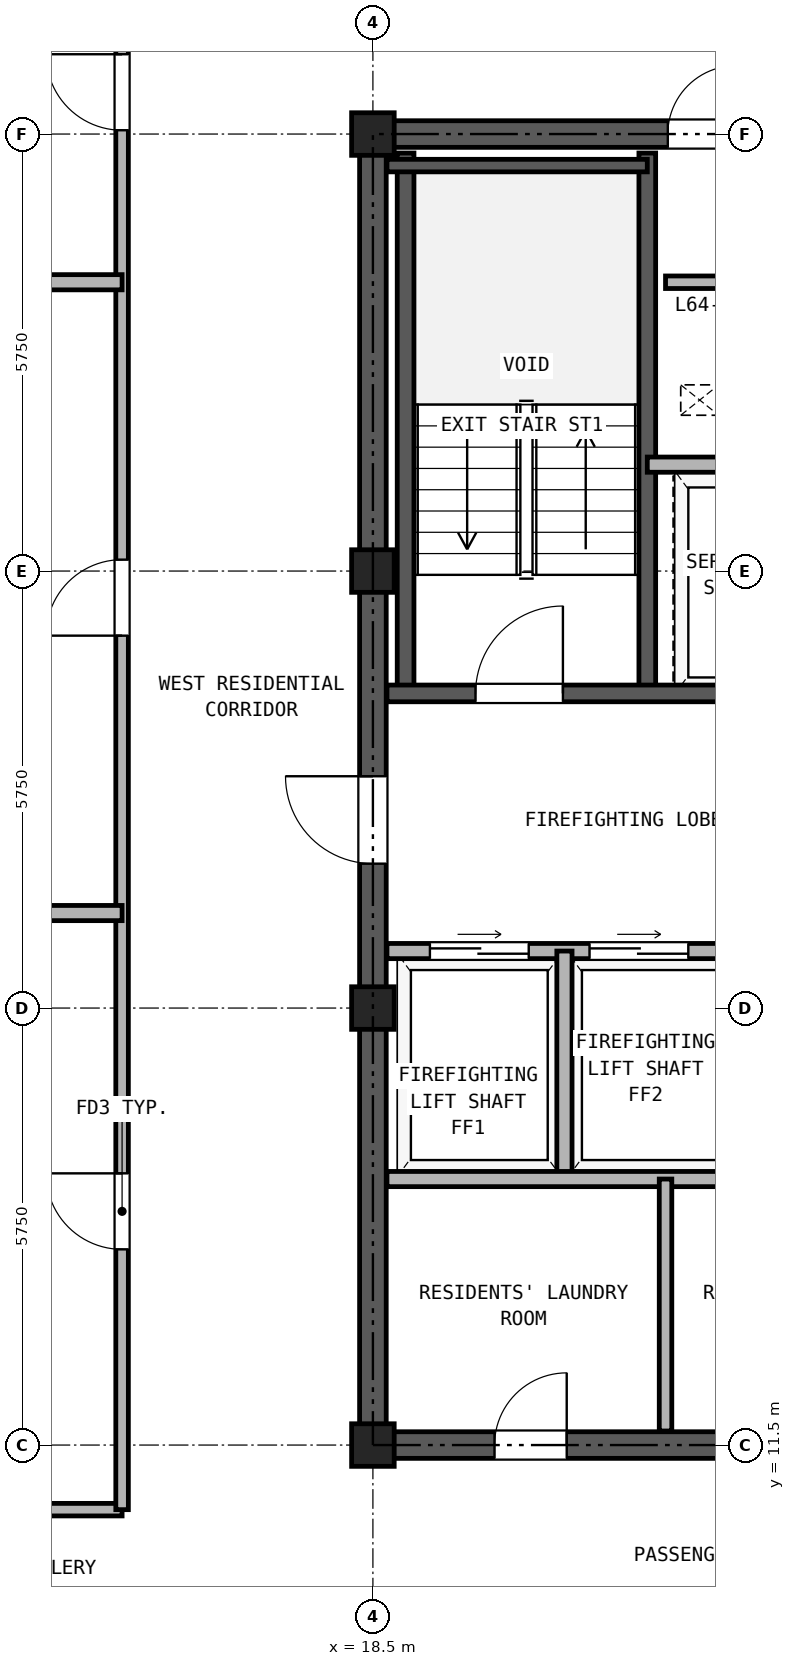
"""IFC4 building model, lengths in metres.
Left out: names, types, materials, properties, quantities, classifications, styles, units other than length and angle.
Written with IfcOpenShell. Run it as: python <this file> out.ifc"""

import sys

from ifc_helpers import new_model, si_unit, direction, frame, frame_2d, origin, origin_2d, place, context, subcontext, project, spatial, rectangle, hollow_rectangle, extrude, source, transform, mapped, element, fill, save


model = new_model("IFC4")
c1 = context("Model", 3, precision=1e-05, world=origin(), true_north=direction((0.0, 1.0)))
c2 = subcontext(c1, "Body", "Model", "MODEL_VIEW")
j1 = project(units=[si_unit("LENGTHUNIT", "METRE"), si_unit("PLANEANGLEUNIT", "RADIAN")], contexts=[c1])
p1 = place(None, origin())
s1 = spatial("IfcSite", under=j1, at=p1, CompositionType="ELEMENT")
p2 = place(p1, origin())
s2 = spatial("IfcBuilding", under=s1, at=p2, CompositionType="ELEMENT")
p3 = place(p2, frame((0.0, 0.0, 226.5)))
s3 = spatial("IfcBuildingStorey", under=s2, at=p3, CompositionType="ELEMENT", Elevation=226.5)
m1 = source(origin(), c2, "Body", "SweptSolid", [
    extrude(hollow_rectangle(XDim=0.56, YDim=0.56, WallThickness=0.03, at=origin_2d()), origin(), (0.0, 0.0, 1.0), 2.98),
])
for number, where, z_axis, x_axis in (
    (1, (18.5, 11.5, 0.0), (0.0, 0.0, 1.0), (1.0, 0.0, 0.0)),
    (2, (18.5, 17.25, 0.0), (0.0, 0.0, 1.0), (1.0, 0.0, 0.0)),
    (3, (18.5, 23.0, 0.0), (0.0, 0.0, 1.0), (1.0, 0.0, 0.0)),
    (4, (18.5, 28.75, 0.0), (0.0, 0.0, 1.0), (1.0, 0.0, 0.0)),
):
    element("IfcColumn", number, at=place(p3, frame(where, z_axis=z_axis, x_axis=x_axis)), inside=s3, PredefinedType="COLUMN", context=c2, shape_type="MappedRepresentation", body=[
        mapped(m1, transform((0.0, 0.0, 0.0), x_axis=(1.0, 0.0, 0.0), y_axis=(0.0, 1.0, 0.0), z_axis=(0.0, 0.0, 1.0), scale=1.0)),
    ])
p4 = place(p3, frame((18.325, 11.5, 0.0), z_axis=(0.0, 0.0, 1.0), x_axis=(1.0, 0.0, 0.0)))
e5 = element("IfcWall", 5, at=p4, inside=s3, PredefinedType="SHEAR", context=c2, shape_type="SweptSolid", body=[
    extrude(rectangle(XDim=10.35, YDim=0.35, at=frame_2d((5.175, 0.0))), origin(), (0.0, 0.0, 1.0), 2.98),
])
p5 = place(p4, frame((1.775, 0.0, 0.0)))
e6 = element("IfcOpeningElement", 6, at=p5, cuts=e5, PredefinedType="OPENING", context=c2, shape_type="SweptSolid", body=[
    extrude(rectangle(XDim=0.95, YDim=2.15, at=frame_2d((0.475, 1.075))), frame((0.0, 0.185, 0.0), z_axis=(0.0, -1.0, 0.0), x_axis=(1.0, 0.0, 0.0)), (0.0, 0.0, 1.0), 0.37),
])
p6 = place(p4, frame((5.275, 0.0, 0.0)))
e7 = element("IfcOpeningElement", 7, at=p6, cuts=e5, PredefinedType="OPENING", context=c2, shape_type="SweptSolid", body=[
    extrude(rectangle(XDim=0.95, YDim=2.15, at=frame_2d((0.475, 1.075))), frame((0.0, 0.185, 0.0), z_axis=(0.0, -1.0, 0.0), x_axis=(1.0, 0.0, 0.0)), (0.0, 0.0, 1.0), 0.37),
])
p7 = place(p4, frame((8.175, 0.0, 0.0)))
e8 = element("IfcOpeningElement", 8, at=p7, cuts=e5, PredefinedType="OPENING", context=c2, shape_type="SweptSolid", body=[
    extrude(rectangle(XDim=1.1, YDim=2.25, at=frame_2d((0.55, 1.125))), frame((0.0, 0.185, 0.0), z_axis=(0.0, -1.0, 0.0), x_axis=(1.0, 0.0, 0.0)), (0.0, 0.0, 1.0), 0.37),
])
p8 = place(p3, frame((18.325, 28.75, 0.0), z_axis=(0.0, 0.0, 1.0), x_axis=(1.0, 0.0, 0.0)))
e9 = element("IfcWall", 9, at=p8, inside=s3, PredefinedType="SHEAR", context=c2, shape_type="SweptSolid", body=[
    extrude(rectangle(XDim=10.35, YDim=0.35, at=frame_2d((5.175, 0.0))), origin(), (0.0, 0.0, 1.0), 2.98),
])
p9 = place(p8, frame((4.055, 0.0, 0.0)))
e10 = element("IfcOpeningElement", 10, at=p9, cuts=e9, PredefinedType="OPENING", context=c2, shape_type="SweptSolid", body=[
    extrude(rectangle(XDim=0.9, YDim=2.05, at=frame_2d((0.45, 1.025))), frame((0.0, 0.185, 0.0), z_axis=(0.0, -1.0, 0.0), x_axis=(1.0, 0.0, 0.0)), (0.0, 0.0, 1.0), 0.37),
])
p10 = place(p8, frame((5.595, 0.0, 0.0)))
e11 = element("IfcOpeningElement", 11, at=p10, cuts=e9, PredefinedType="OPENING", context=c2, shape_type="SweptSolid", body=[
    extrude(rectangle(XDim=0.9, YDim=2.05, at=frame_2d((0.45, 1.025))), frame((0.0, 0.185, 0.0), z_axis=(0.0, -1.0, 0.0), x_axis=(1.0, 0.0, 0.0)), (0.0, 0.0, 1.0), 0.37),
])
p11 = place(p3, frame((18.5, 11.675, 0.0), z_axis=(0.0, 0.0, 1.0), x_axis=(0.0, 1.0, 0.0)))
e12 = element("IfcWall", 12, at=p11, inside=s3, PredefinedType="SHEAR", context=c2, shape_type="SweptSolid", body=[
    extrude(rectangle(XDim=16.9, YDim=0.35, at=frame_2d((8.45, 0.0))), origin(), (0.0, 0.0, 1.0), 2.98),
])
p12 = place(p11, frame((7.475, 0.0, 0.0)))
e13 = element("IfcOpeningElement", 13, at=p12, cuts=e12, PredefinedType="OPENING", context=c2, shape_type="SweptSolid", body=[
    extrude(rectangle(XDim=1.15, YDim=2.2, at=frame_2d((0.575, 1.1))), frame((0.0, 0.185, 0.0), z_axis=(0.0, -1.0, 0.0), x_axis=(1.0, 0.0, 0.0)), (0.0, 0.0, 1.0), 0.37),
])
for number, where, z_axis, x_axis in (
    (14, (18.93, 21.39, 0.0), (0.0, 0.0, 1.0), (0.0, 1.0, 0.0)),
    (15, (22.11, 21.39, 0.0), (0.0, 0.0, 1.0), (0.0, 1.0, 0.0)),
):
    element("IfcWall", number, at=place(p3, frame(where, z_axis=z_axis, x_axis=x_axis)), inside=s3, PredefinedType="SOLIDWALL", context=c2, shape_type="SweptSolid", body=[
        extrude(rectangle(XDim=7.11, YDim=0.22, at=frame_2d((3.555, 0.0))), origin(), (0.0, 0.0, 1.0), 2.98),
    ])
p13 = place(p3, frame((18.685, 28.335, 0.0), z_axis=(0.0, 0.0, 1.0), x_axis=(1.0, 0.0, 0.0)))
e16 = element("IfcWall", 16, at=p13, inside=s3, PredefinedType="PARTITIONING", context=c2, shape_type="SweptSolid", body=[
    extrude(rectangle(XDim=3.425, YDim=0.165, at=frame_2d((1.712, 0.0))), origin(), (0.0, 0.0, 1.0), 2.98),
])
p14 = place(p3, frame((18.685, 21.39, 0.0), z_axis=(0.0, 0.0, 1.0), x_axis=(1.0, 0.0, 0.0)))
e17 = element("IfcWall", 17, at=p14, inside=s3, PredefinedType="SOLIDWALL", context=c2, shape_type="SweptSolid", body=[
    extrude(rectangle(XDim=6.445, YDim=0.22, at=frame_2d((3.222, 0.0))), origin(), (0.0, 0.0, 1.0), 2.98),
])
p15 = place(p14, frame((1.165, 0.0, 0.0)))
e18 = element("IfcOpeningElement", 18, at=p15, cuts=e17, PredefinedType="OPENING", context=c2, shape_type="SweptSolid", body=[
    extrude(rectangle(XDim=1.15, YDim=2.2, at=frame_2d((0.575, 1.1))), frame((0.0, 0.12, 0.0), z_axis=(0.0, -1.0, 0.0), x_axis=(1.0, 0.0, 0.0)), (0.0, 0.0, 1.0), 0.24),
])
p16 = place(p14, frame((4.895, 0.0, 0.0)))
e19 = element("IfcOpeningElement", 19, at=p16, cuts=e17, PredefinedType="OPENING", context=c2, shape_type="SweptSolid", body=[
    extrude(rectangle(XDim=1.1, YDim=2.25, at=frame_2d((0.55, 1.125))), frame((0.0, 0.12, 0.0), z_axis=(0.0, -1.0, 0.0), x_axis=(1.0, 0.0, 0.0)), (0.0, 0.0, 1.0), 0.24),
])
p17 = place(p3, frame((22.11, 24.4, 0.0), z_axis=(0.0, 0.0, 1.0), x_axis=(1.0, 0.0, 0.0)))
e20 = element("IfcWall", 20, at=p17, inside=s3, PredefinedType="PARTITIONING", context=c2, shape_type="SweptSolid", body=[
    extrude(rectangle(XDim=3.02, YDim=0.2, at=frame_2d((1.51, 0.0))), origin(), (0.0, 0.0, 1.0), 2.98),
])
p18 = place(p3, frame((18.685, 18.0, 0.0), z_axis=(0.0, 0.0, 1.0), x_axis=(1.0, 0.0, 0.0)))
e21 = element("IfcWall", 21, at=p18, inside=s3, PredefinedType="PARTITIONING", context=c2, shape_type="SweptSolid", body=[
    extrude(rectangle(XDim=9.63, YDim=0.2, at=frame_2d((4.815, 0.0))), origin(), (0.0, 0.0, 1.0), 2.98),
])
p19 = place(p18, frame((0.565, 0.0, 0.0)))
e22 = element("IfcOpeningElement", 22, at=p19, cuts=e21, PredefinedType="OPENING", context=c2, shape_type="SweptSolid", body=[
    extrude(rectangle(XDim=1.3, YDim=2.3, at=frame_2d((0.65, 1.15))), frame((0.0, 0.11, 0.0), z_axis=(0.0, -1.0, 0.0), x_axis=(1.0, 0.0, 0.0)), (0.0, 0.0, 1.0), 0.22),
])
p20 = place(p18, frame((2.665, 0.0, 0.0)))
e23 = element("IfcOpeningElement", 23, at=p20, cuts=e21, PredefinedType="OPENING", context=c2, shape_type="SweptSolid", body=[
    extrude(rectangle(XDim=1.3, YDim=2.3, at=frame_2d((0.65, 1.15))), frame((0.0, 0.11, 0.0), z_axis=(0.0, -1.0, 0.0), x_axis=(1.0, 0.0, 0.0)), (0.0, 0.0, 1.0), 0.22),
])
p21 = place(p18, frame((5.085, 0.0, 0.0)))
e24 = element("IfcOpeningElement", 24, at=p21, cuts=e21, PredefinedType="OPENING", context=c2, shape_type="SweptSolid", body=[
    extrude(rectangle(XDim=0.9, YDim=2.05, at=frame_2d((0.45, 1.025))), frame((0.0, 0.11, 0.0), z_axis=(0.0, -1.0, 0.0), x_axis=(1.0, 0.0, 0.0)), (0.0, 0.0, 1.0), 0.22),
])
p22 = place(p18, frame((8.215, 0.0, 0.0)))
e25 = element("IfcOpeningElement", 25, at=p22, cuts=e21, PredefinedType="OPENING", context=c2, shape_type="SweptSolid", body=[
    extrude(rectangle(XDim=0.9, YDim=2.05, at=frame_2d((0.45, 1.025))), frame((0.0, 0.11, 0.0), z_axis=(0.0, -1.0, 0.0), x_axis=(1.0, 0.0, 0.0)), (0.0, 0.0, 1.0), 0.22),
])
p23 = place(p3, frame((21.02, 15.0, 0.0), z_axis=(0.0, 0.0, 1.0), x_axis=(0.0, 1.0, 0.0)))
e26 = element("IfcWall", 26, at=p23, inside=s3, PredefinedType="PARTITIONING", context=c2, shape_type="SweptSolid", body=[
    extrude(rectangle(XDim=3.0, YDim=0.2, at=frame_2d((1.5, 0.0))), origin(), (0.0, 0.0, 1.0), 2.98),
])
p24 = place(p3, frame((18.685, 15.0, 0.0), z_axis=(0.0, 0.0, 1.0), x_axis=(1.0, 0.0, 0.0)))
e27 = element("IfcWall", 27, at=p24, inside=s3, PredefinedType="PARTITIONING", context=c2, shape_type="SweptSolid", body=[
    extrude(rectangle(XDim=9.63, YDim=0.2, at=frame_2d((4.815, 0.0))), origin(), (0.0, 0.0, 1.0), 2.98),
])
p25 = place(p3, frame((22.35, 11.685, 0.0), z_axis=(0.0, 0.0, 1.0), x_axis=(0.0, 1.0, 0.0)))
e28 = element("IfcWall", 28, at=p25, inside=s3, PredefinedType="PARTITIONING", context=c2, shape_type="SweptSolid", body=[
    extrude(rectangle(XDim=3.315, YDim=0.165, at=frame_2d((1.657, 0.0))), origin(), (0.0, 0.0, 1.0), 2.98),
])
p26 = place(p3, frame((8.56, 10.65, 0.0), z_axis=(0.0, 0.0, 1.0), x_axis=(1.0, 0.0, 0.0)))
e29 = element("IfcWall", 29, at=p26, inside=s3, PredefinedType="PARTITIONING", context=c2, shape_type="SweptSolid", body=[
    extrude(rectangle(XDim=6.64, YDim=0.165, at=frame_2d((3.32, 0.0))), origin(), (0.0, 0.0, 1.0), 2.98),
])
p27 = place(p3, frame((15.2, 10.65, 0.0), z_axis=(0.0, 0.0, 1.0), x_axis=(0.0, 1.0, 0.0)))
e30 = element("IfcWall", 30, at=p27, inside=s3, PredefinedType="PARTITIONING", context=c2, shape_type="SweptSolid", body=[
    extrude(rectangle(XDim=24.49, YDim=0.165, at=frame_2d((12.245, 0.0))), origin(), (0.0, 0.0, 1.0), 2.98),
])
p28 = place(p27, frame((3.425, 0.0, 0.0)))
e31 = element("IfcOpeningElement", 31, at=p28, cuts=e30, PredefinedType="OPENING", context=c2, shape_type="SweptSolid", body=[
    extrude(rectangle(XDim=1.0, YDim=2.15, at=frame_2d((0.5, 1.075))), frame((0.0, 0.093, 0.0), z_axis=(0.0, -1.0, 0.0), x_axis=(1.0, 0.0, 0.0)), (0.0, 0.0, 1.0), 0.185),
])
p29 = place(p27, frame((11.5, 0.0, 0.0)))
e32 = element("IfcOpeningElement", 32, at=p29, cuts=e30, PredefinedType="OPENING", context=c2, shape_type="SweptSolid", body=[
    extrude(rectangle(XDim=1.0, YDim=2.15, at=frame_2d((0.5, 1.075))), frame((0.0, 0.093, 0.0), z_axis=(0.0, -1.0, 0.0), x_axis=(1.0, 0.0, 0.0)), (0.0, 0.0, 1.0), 0.185),
])
p30 = place(p27, frame((18.15, 0.0, 0.0)))
e33 = element("IfcOpeningElement", 33, at=p30, cuts=e30, PredefinedType="OPENING", context=c2, shape_type="SweptSolid", body=[
    extrude(rectangle(XDim=1.0, YDim=2.15, at=frame_2d((0.5, 1.075))), frame((0.0, 0.093, 0.0), z_axis=(0.0, -1.0, 0.0), x_axis=(1.0, 0.0, 0.0)), (0.0, 0.0, 1.0), 0.185),
])
for number, where, z_axis, x_axis in (
    (34, (5.36, 18.5, 0.0), (0.0, 0.0, 1.0), (1.0, 0.0, 0.0)),
    (35, (5.36, 26.8, 0.0), (0.0, 0.0, 1.0), (1.0, 0.0, 0.0)),
):
    element("IfcWall", number, at=place(p3, frame(where, z_axis=z_axis, x_axis=x_axis)), inside=s3, PredefinedType="PARTITIONING", context=c2, shape_type="SweptSolid", body=[
        extrude(rectangle(XDim=9.84, YDim=0.2, at=frame_2d((4.92, 0.0))), origin(), (0.0, 0.0, 1.0), 2.98),
    ])
p31 = place(p3, frame((22.35, 26.8, 0.0), z_axis=(0.0, 0.0, 1.0), x_axis=(1.0, 0.0, 0.0)))
e36 = element("IfcWall", 36, at=p31, inside=s3, PredefinedType="PARTITIONING", context=c2, shape_type="SweptSolid", body=[
    extrude(rectangle(XDim=1.1, YDim=0.165, at=frame_2d((0.55, 0.0))), origin(), (0.0, 0.0, 1.0), 2.98),
])
p32 = place(p15, frame((1.15, 0.0, 0.0), z_axis=(0.0, 0.0, 1.0), x_axis=(-1.0, 0.0, 0.0)))
e37 = element("IfcDoor", 37, at=p32, inside=s3, OperationType="SINGLE_SWING_RIGHT", PredefinedType="DOOR", context=c2, shape_type="SweptSolid", body=[
    extrude(rectangle(XDim=1.15, YDim=2.2, at=frame_2d((0.575, 1.1))), frame((0.0, 0.025, 0.0), z_axis=(0.0, -1.0, 0.0), x_axis=(1.0, 0.0, 0.0)), (0.0, 0.0, 1.0), 0.05),
])
fill(e18, e37)
p33 = place(p19, origin())
e38 = element("IfcDoor", 38, at=p33, inside=s3, OperationType="DOUBLE_DOOR_SLIDING", PredefinedType="DOOR", context=c2, shape_type="SweptSolid", body=[
    extrude(rectangle(XDim=1.3, YDim=2.3, at=frame_2d((0.65, 1.15))), frame((0.0, 0.025, 0.0), z_axis=(0.0, -1.0, 0.0), x_axis=(1.0, 0.0, 0.0)), (0.0, 0.0, 1.0), 0.05),
])
fill(e22, e38)
p34 = place(p20, origin())
e39 = element("IfcDoor", 39, at=p34, inside=s3, OperationType="DOUBLE_DOOR_SLIDING", PredefinedType="DOOR", context=c2, shape_type="SweptSolid", body=[
    extrude(rectangle(XDim=1.3, YDim=2.3, at=frame_2d((0.65, 1.15))), frame((0.0, 0.025, 0.0), z_axis=(0.0, -1.0, 0.0), x_axis=(1.0, 0.0, 0.0)), (0.0, 0.0, 1.0), 0.05),
])
fill(e23, e39)
p35 = place(p12, frame((1.15, 0.0, 0.0), z_axis=(0.0, 0.0, 1.0), x_axis=(-1.0, 0.0, 0.0)))
e40 = element("IfcDoor", 40, at=p35, inside=s3, OperationType="SINGLE_SWING_RIGHT", PredefinedType="DOOR", context=c2, shape_type="SweptSolid", body=[
    extrude(rectangle(XDim=1.15, YDim=2.2, at=frame_2d((0.575, 1.1))), frame((0.0, 0.025, 0.0), z_axis=(0.0, -1.0, 0.0), x_axis=(1.0, 0.0, 0.0)), (0.0, 0.0, 1.0), 0.05),
])
fill(e13, e40)
p36 = place(p9, origin())
e41 = element("IfcDoor", 41, at=p36, inside=s3, OperationType="SINGLE_SWING_RIGHT", PredefinedType="DOOR", context=c2, shape_type="SweptSolid", body=[
    extrude(rectangle(XDim=0.9, YDim=2.05, at=frame_2d((0.45, 1.025))), frame((0.0, 0.025, 0.0), z_axis=(0.0, -1.0, 0.0), x_axis=(1.0, 0.0, 0.0)), (0.0, 0.0, 1.0), 0.05),
])
fill(e10, e41)
p37 = place(p5, frame((0.95, 0.0, 0.0), z_axis=(0.0, 0.0, 1.0), x_axis=(-1.0, 0.0, 0.0)))
e42 = element("IfcDoor", 42, at=p37, inside=s3, OperationType="SINGLE_SWING_RIGHT", PredefinedType="DOOR", context=c2, shape_type="SweptSolid", body=[
    extrude(rectangle(XDim=0.95, YDim=2.15, at=frame_2d((0.475, 1.075))), frame((0.0, 0.025, 0.0), z_axis=(0.0, -1.0, 0.0), x_axis=(1.0, 0.0, 0.0)), (0.0, 0.0, 1.0), 0.05),
])
fill(e6, e42)
p38 = place(p28, origin())
e43 = element("IfcDoor", 43, at=p38, inside=s3, OperationType="SINGLE_SWING_RIGHT", PredefinedType="DOOR", context=c2, shape_type="SweptSolid", body=[
    extrude(rectangle(XDim=1.0, YDim=2.15, at=frame_2d((0.5, 1.075))), frame((0.0, 0.025, 0.0), z_axis=(0.0, -1.0, 0.0), x_axis=(1.0, 0.0, 0.0)), (0.0, 0.0, 1.0), 0.05),
])
fill(e31, e43)
p39 = place(p29, origin())
e44 = element("IfcDoor", 44, at=p39, inside=s3, OperationType="SINGLE_SWING_LEFT", PredefinedType="DOOR", context=c2, shape_type="SweptSolid", body=[
    extrude(rectangle(XDim=1.0, YDim=2.15, at=frame_2d((0.5, 1.075))), frame((0.0, 0.025, 0.0), z_axis=(0.0, -1.0, 0.0), x_axis=(1.0, 0.0, 0.0)), (0.0, 0.0, 1.0), 0.05),
])
fill(e32, e44)
p40 = place(p30, origin())
e45 = element("IfcDoor", 45, at=p40, inside=s3, OperationType="SINGLE_SWING_RIGHT", PredefinedType="DOOR", context=c2, shape_type="SweptSolid", body=[
    extrude(rectangle(XDim=1.0, YDim=2.15, at=frame_2d((0.5, 1.075))), frame((0.0, 0.025, 0.0), z_axis=(0.0, -1.0, 0.0), x_axis=(1.0, 0.0, 0.0)), (0.0, 0.0, 1.0), 0.05),
])
fill(e33, e45)
save(model, sys.argv[1])
